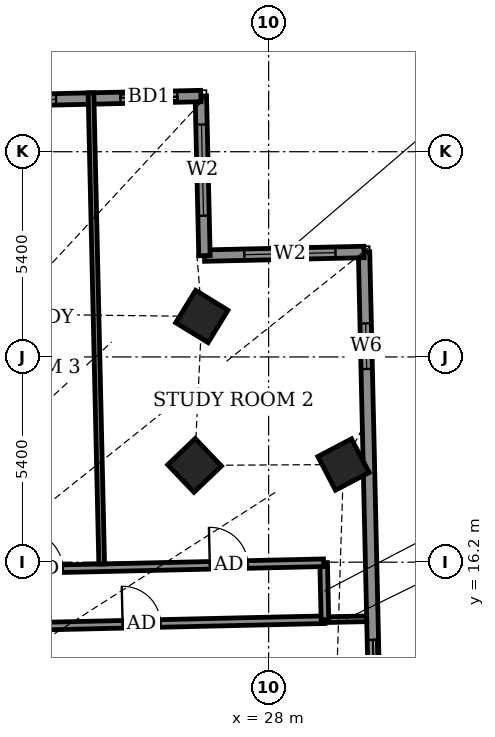
"""IFC4 building model, lengths in metres.
Left out: names, types, materials, properties, quantities, classifications, styles, units other than length and angle.
Written with IfcOpenShell. Run it as: python <this file> out.ifc"""

import sys

from ifc_helpers import new_model, si_unit, direction, frame, frame_2d, origin, origin_2d, place, context, subcontext, project, spatial, rectangle, extrude, element, fill, save


model = new_model("IFC4")
c1 = context("Model", 3, precision=1e-05, world=origin(), true_north=direction((0.0, 1.0)))
c2 = subcontext(c1, "Body", "Model", "MODEL_VIEW")
j1 = project(units=[si_unit("LENGTHUNIT", "METRE"), si_unit("PLANEANGLEUNIT", "RADIAN")], contexts=[c1])
p1 = place(None, origin())
s1 = spatial("IfcSite", under=j1, at=p1, CompositionType="ELEMENT")
p2 = place(p1, origin())
s2 = spatial("IfcBuilding", under=s1, at=p2, CompositionType="ELEMENT")
p3 = place(p2, frame((0.0, 0.0, 275.3)))
s3 = spatial("IfcBuildingStorey", under=s2, at=p3, CompositionType="ELEMENT", Elevation=275.3)
for number, where, z_axis, x_axis in (
    (1, (29.969, 18.77, -0.55), (0.0, 0.0, 1.0), (-0.465, 0.885, 0.0)),
    (2, (26.052, 18.747, -0.55), (0.0, 0.0, 1.0), (-0.691, 0.723, 0.0)),
    (3, (26.243, 22.665, -0.55), (0.0, 0.0, 1.0), (-0.852, 0.523, 0.0)),
):
    element("IfcColumn", number, at=place(p3, frame(where, z_axis=z_axis, x_axis=x_axis)), inside=s3, PredefinedType="COLUMN", context=c2, shape_type="SweptSolid", body=[
        extrude(rectangle(XDim=1.0, YDim=1.0, at=origin_2d()), origin(), (0.0, 0.0, 1.0), 4.6),
    ])
p4 = place(p3, frame((30.86, 8.973, 0.0), z_axis=(0.0, 0.0, 1.0), x_axis=(-0.022743742485, 0.999741327633, 0.0)))
e4 = element("IfcWall", 4, at=p4, inside=s3, PredefinedType="SOLIDWALL", context=c2, shape_type="SweptSolid", body=[
    extrude(rectangle(XDim=15.393, YDim=0.3, at=frame_2d((7.697, 0.0))), origin(), (0.0, 0.0, 1.0), 2.35),
])
p5 = place(p4, frame((3.684, 0.0, 0.0)))
e5 = element("IfcOpeningElement", 5, at=p5, cuts=e4, PredefinedType="OPENING", context=c2, shape_type="SweptSolid", body=[
    extrude(rectangle(XDim=1.5, YDim=2.0, at=frame_2d((0.75, 1.0))), frame((0.0, 0.16, 0.0), z_axis=(0.0, -1.0, 0.0), x_axis=(1.0, 0.0, 0.0)), (0.0, 0.0, 1.0), 0.32),
])
p6 = place(p4, frame((12.313, 0.0, 0.5)))
e6 = element("IfcOpeningElement", 6, at=p6, cuts=e4, PredefinedType="OPENING", context=c2, shape_type="SweptSolid", body=[
    extrude(rectangle(XDim=1.2, YDim=1.1, at=frame_2d((0.6, 0.55))), frame((0.0, 0.16, 0.0), z_axis=(0.0, -1.0, 0.0), x_axis=(1.0, 0.0, 0.0)), (0.0, 0.0, 1.0), 0.32),
])
p7 = place(p3, frame((30.51, 24.362, 0.0), z_axis=(0.0, 0.0, 1.0), x_axis=(-0.999739037152, -0.022844202663, 0.0)))
e7 = element("IfcWall", 7, at=p7, inside=s3, PredefinedType="SOLIDWALL", context=c2, shape_type="SweptSolid", body=[
    extrude(rectangle(XDim=4.2, YDim=0.3, at=frame_2d((2.1, 0.0))), origin(), (0.0, 0.0, 1.0), 2.55),
])
p8 = place(p7, frame((0.75, 0.0, 0.9)))
e8 = element("IfcOpeningElement", 8, at=p8, cuts=e7, PredefinedType="OPENING", context=c2, shape_type="SweptSolid", body=[
    extrude(rectangle(XDim=2.4, YDim=1.5, at=frame_2d((1.2, 0.75))), frame((0.0, 0.16, 0.0), z_axis=(0.0, -1.0, 0.0), x_axis=(1.0, 0.0, 0.0)), (0.0, 0.0, 1.0), 0.32),
])
p9 = place(p3, frame((26.311, 24.266, 0.0), z_axis=(0.0, 0.0, 1.0), x_axis=(-0.022611811187, 0.999744320311, 0.0)))
e9 = element("IfcWall", 9, at=p9, inside=s3, PredefinedType="SOLIDWALL", context=c2, shape_type="SweptSolid", body=[
    extrude(rectangle(XDim=4.2, YDim=0.3, at=frame_2d((2.1, 0.0))), origin(), (0.0, 0.0, 1.0), 2.55),
])
p10 = place(p9, frame((1.05, 0.0, 0.9)))
e10 = element("IfcOpeningElement", 10, at=p10, cuts=e9, PredefinedType="OPENING", context=c2, shape_type="SweptSolid", body=[
    extrude(rectangle(XDim=2.4, YDim=1.5, at=frame_2d((1.2, 0.75))), frame((0.0, 0.16, 0.0), z_axis=(0.0, -1.0, 0.0), x_axis=(1.0, 0.0, 0.0)), (0.0, 0.0, 1.0), 0.32),
])
p11 = place(p3, frame((26.216, 28.465, 0.0), z_axis=(0.0, 0.0, 1.0), x_axis=(-0.999742843677, -0.022677004157, 0.0)))
e11 = element("IfcWall", 11, at=p11, inside=s3, PredefinedType="SOLIDWALL", context=c2, shape_type="SweptSolid", body=[
    extrude(rectangle(XDim=49.836, YDim=0.3, at=frame_2d((24.918, 0.0))), origin(), (0.0, 0.0, 1.0), 2.45),
])
p12 = place(p11, frame((0.618, 0.0, 0.0)))
e12 = element("IfcOpeningElement", 12, at=p12, cuts=e11, PredefinedType="OPENING", context=c2, shape_type="SweptSolid", body=[
    extrude(rectangle(XDim=1.5, YDim=2.4, at=frame_2d((0.75, 1.2))), frame((0.0, 0.16, 0.0), z_axis=(0.0, -1.0, 0.0), x_axis=(1.0, 0.0, 0.0)), (0.0, 0.0, 1.0), 0.32),
])
p13 = place(p11, frame((3.811, 0.0, 0.9)))
e13 = element("IfcOpeningElement", 13, at=p13, cuts=e11, PredefinedType="OPENING", context=c2, shape_type="SweptSolid", body=[
    extrude(rectangle(XDim=1.2, YDim=1.5, at=frame_2d((0.6, 0.75))), frame((0.0, 0.16, 0.0), z_axis=(0.0, -1.0, 0.0), x_axis=(1.0, 0.0, 0.0)), (0.0, 0.0, 1.0), 0.32),
])
p14 = place(p11, frame((7.736, 0.0, 0.9)))
e14 = element("IfcOpeningElement", 14, at=p14, cuts=e11, PredefinedType="OPENING", context=c2, shape_type="SweptSolid", body=[
    extrude(rectangle(XDim=2.4, YDim=1.5, at=frame_2d((1.2, 0.75))), frame((0.0, 0.16, 0.0), z_axis=(0.0, -1.0, 0.0), x_axis=(1.0, 0.0, 0.0)), (0.0, 0.0, 1.0), 0.32),
])
p15 = place(p11, frame((13.686, 0.0, 0.0)))
e15 = element("IfcOpeningElement", 15, at=p15, cuts=e11, PredefinedType="OPENING", context=c2, shape_type="SweptSolid", body=[
    extrude(rectangle(XDim=1.5, YDim=2.4, at=frame_2d((0.75, 1.2))), frame((0.0, 0.16, 0.0), z_axis=(0.0, -1.0, 0.0), x_axis=(1.0, 0.0, 0.0)), (0.0, 0.0, 1.0), 0.32),
])
p16 = place(p11, frame((18.686, 0.0, 0.0)))
e16 = element("IfcOpeningElement", 16, at=p16, cuts=e11, PredefinedType="OPENING", context=c2, shape_type="SweptSolid", body=[
    extrude(rectangle(XDim=1.5, YDim=2.4, at=frame_2d((0.75, 1.2))), frame((0.0, 0.16, 0.0), z_axis=(0.0, -1.0, 0.0), x_axis=(1.0, 0.0, 0.0)), (0.0, 0.0, 1.0), 0.32),
])
p17 = place(p11, frame((23.711, 0.0, 0.0)))
e17 = element("IfcOpeningElement", 17, at=p17, cuts=e11, PredefinedType="OPENING", context=c2, shape_type="SweptSolid", body=[
    extrude(rectangle(XDim=1.5, YDim=2.4, at=frame_2d((0.75, 1.2))), frame((0.0, 0.16, 0.0), z_axis=(0.0, -1.0, 0.0), x_axis=(1.0, 0.0, 0.0)), (0.0, 0.0, 1.0), 0.32),
])
p18 = place(p11, frame((30.486, 0.0, 0.0)))
e18 = element("IfcOpeningElement", 18, at=p18, cuts=e11, PredefinedType="OPENING", context=c2, shape_type="SweptSolid", body=[
    extrude(rectangle(XDim=1.5, YDim=2.4, at=frame_2d((0.75, 1.2))), frame((0.0, 0.16, 0.0), z_axis=(0.0, -1.0, 0.0), x_axis=(1.0, 0.0, 0.0)), (0.0, 0.0, 1.0), 0.32),
])
p19 = place(p11, frame((37.286, 0.0, 0.9)))
e19 = element("IfcOpeningElement", 19, at=p19, cuts=e11, PredefinedType="OPENING", context=c2, shape_type="SweptSolid", body=[
    extrude(rectangle(XDim=2.4, YDim=1.5, at=frame_2d((1.2, 0.75))), frame((0.0, 0.16, 0.0), z_axis=(0.0, -1.0, 0.0), x_axis=(1.0, 0.0, 0.0)), (0.0, 0.0, 1.0), 0.32),
])
p20 = place(p11, frame((44.536, 0.0, 0.9)))
e20 = element("IfcOpeningElement", 20, at=p20, cuts=e11, PredefinedType="OPENING", context=c2, shape_type="SweptSolid", body=[
    extrude(rectangle(XDim=2.4, YDim=1.5, at=frame_2d((1.2, 0.75))), frame((0.0, 0.16, 0.0), z_axis=(0.0, -1.0, 0.0), x_axis=(1.0, 0.0, 0.0)), (0.0, 0.0, 1.0), 0.32),
])
p21 = place(p3, frame((18.382, 14.434, 0.0), z_axis=(0.0, 0.0, 1.0), x_axis=(0.999742346277, 0.022698921993, 0.0)))
e21 = element("IfcWall", 21, at=p21, inside=s3, PredefinedType="PARTITIONING", context=c2, shape_type="SweptSolid", body=[
    extrude(rectangle(XDim=11.1, YDim=0.2, at=frame_2d((5.55, 0.0))), origin(), (0.0, 0.0, 1.0), 2.35),
])
p22 = place(p21, frame((5.777, 0.0, 0.0)))
e22 = element("IfcOpeningElement", 22, at=p22, cuts=e21, PredefinedType="OPENING", context=c2, shape_type="SweptSolid", body=[
    extrude(rectangle(XDim=1.0, YDim=2.1, at=frame_2d((0.5, 1.05))), frame((0.0, 0.11, 0.0), z_axis=(0.0, -1.0, 0.0), x_axis=(1.0, 0.0, 0.0)), (0.0, 0.0, 1.0), 0.22),
])
p23 = place(p3, frame((29.479, 14.686, 0.0), z_axis=(0.0, 0.0, 1.0), x_axis=(0.9997438932, 0.022630687329, 0.0)))
e23 = element("IfcWall", 23, at=p23, inside=s3, PredefinedType="PARTITIONING", context=c2, shape_type="SweptSolid", body=[
    extrude(rectangle(XDim=1.1, YDim=0.15, at=frame_2d((0.55, 0.0))), origin(), (0.0, 0.0, 1.0), 2.35),
])
p24 = place(p3, frame((29.481, 14.686, 0.0), z_axis=(0.0, 0.0, 1.0), x_axis=(-0.022617910375, 0.999744182344, 0.0)))
e24 = element("IfcWall", 24, at=p24, inside=s3, PredefinedType="PARTITIONING", context=c2, shape_type="SweptSolid", body=[
    extrude(rectangle(XDim=1.5, YDim=0.2, at=frame_2d((0.75, 0.0))), origin(), (0.0, 0.0, 1.0), 2.35),
])
p25 = place(p3, frame((-24.566, 14.96, 0.0), z_axis=(0.0, 0.0, 1.0), x_axis=(0.999742854064, 0.022676546211, 0.0)))
e25 = element("IfcWall", 25, at=p25, inside=s3, PredefinedType="PARTITIONING", context=c2, shape_type="SweptSolid", body=[
    extrude(rectangle(XDim=54.025, YDim=0.2, at=frame_2d((27.012, 0.0))), origin(), (0.0, 0.0, 1.0), 2.35),
])
p26 = place(p25, frame((51.031, 0.0, 0.0)))
e26 = element("IfcOpeningElement", 26, at=p26, cuts=e25, PredefinedType="OPENING", context=c2, shape_type="SweptSolid", body=[
    extrude(rectangle(XDim=1.0, YDim=2.1, at=frame_2d((0.5, 1.05))), frame((0.0, 0.11, 0.0), z_axis=(0.0, -1.0, 0.0), x_axis=(1.0, 0.0, 0.0)), (0.0, 0.0, 1.0), 0.22),
])
p27 = place(p25, frame((46.164, 0.0, 0.0)))
e27 = element("IfcOpeningElement", 27, at=p27, cuts=e25, PredefinedType="OPENING", context=c2, shape_type="SweptSolid", body=[
    extrude(rectangle(XDim=1.0, YDim=2.1, at=frame_2d((0.5, 1.05))), frame((0.0, 0.11, 0.0), z_axis=(0.0, -1.0, 0.0), x_axis=(1.0, 0.0, 0.0)), (0.0, 0.0, 1.0), 0.22),
])
p28 = place(p25, frame((41.639, 0.0, 0.0)))
e28 = element("IfcOpeningElement", 28, at=p28, cuts=e25, PredefinedType="OPENING", context=c2, shape_type="SweptSolid", body=[
    extrude(rectangle(XDim=1.0, YDim=2.1, at=frame_2d((0.5, 1.05))), frame((0.0, 0.11, 0.0), z_axis=(0.0, -1.0, 0.0), x_axis=(1.0, 0.0, 0.0)), (0.0, 0.0, 1.0), 0.22),
])
p29 = place(p25, frame((37.389, 0.0, 0.0)))
e29 = element("IfcOpeningElement", 29, at=p29, cuts=e25, PredefinedType="OPENING", context=c2, shape_type="SweptSolid", body=[
    extrude(rectangle(XDim=0.9, YDim=2.1, at=frame_2d((0.45, 1.05))), frame((0.0, 0.11, 0.0), z_axis=(0.0, -1.0, 0.0), x_axis=(1.0, 0.0, 0.0)), (0.0, 0.0, 1.0), 0.22),
])
p30 = place(p25, frame((29.989, 0.0, 0.0)))
e30 = element("IfcOpeningElement", 30, at=p30, cuts=e25, PredefinedType="OPENING", context=c2, shape_type="SweptSolid", body=[
    extrude(rectangle(XDim=0.9, YDim=2.1, at=frame_2d((0.45, 1.05))), frame((0.0, 0.11, 0.0), z_axis=(0.0, -1.0, 0.0), x_axis=(1.0, 0.0, 0.0)), (0.0, 0.0, 1.0), 0.22),
])
p31 = place(p25, frame((27.364, 0.0, 0.0)))
e31 = element("IfcOpeningElement", 31, at=p31, cuts=e25, PredefinedType="OPENING", context=c2, shape_type="SweptSolid", body=[
    extrude(rectangle(XDim=0.9, YDim=2.1, at=frame_2d((0.45, 1.05))), frame((0.0, 0.11, 0.0), z_axis=(0.0, -1.0, 0.0), x_axis=(1.0, 0.0, 0.0)), (0.0, 0.0, 1.0), 0.22),
])
p32 = place(p25, frame((18.139, 0.0, 0.0)))
e32 = element("IfcOpeningElement", 32, at=p32, cuts=e25, PredefinedType="OPENING", context=c2, shape_type="SweptSolid", body=[
    extrude(rectangle(XDim=1.0, YDim=2.1, at=frame_2d((0.5, 1.05))), frame((0.0, 0.11, 0.0), z_axis=(0.0, -1.0, 0.0), x_axis=(1.0, 0.0, 0.0)), (0.0, 0.0, 1.0), 0.22),
])
p33 = place(p25, frame((22.439, 0.0, 0.0)))
e33 = element("IfcOpeningElement", 33, at=p33, cuts=e25, PredefinedType="OPENING", context=c2, shape_type="SweptSolid", body=[
    extrude(rectangle(XDim=0.9, YDim=2.1, at=frame_2d((0.45, 1.05))), frame((0.0, 0.11, 0.0), z_axis=(0.0, -1.0, 0.0), x_axis=(1.0, 0.0, 0.0)), (0.0, 0.0, 1.0), 0.22),
])
p34 = place(p25, frame((12.089, 0.0, 0.0)))
e34 = element("IfcOpeningElement", 34, at=p34, cuts=e25, PredefinedType="OPENING", context=c2, shape_type="SweptSolid", body=[
    extrude(rectangle(XDim=1.0, YDim=2.1, at=frame_2d((0.5, 1.05))), frame((0.0, 0.11, 0.0), z_axis=(0.0, -1.0, 0.0), x_axis=(1.0, 0.0, 0.0)), (0.0, 0.0, 1.0), 0.22),
])
p35 = place(p25, frame((2.918, 0.0, 0.0)))
e35 = element("IfcOpeningElement", 35, at=p35, cuts=e25, PredefinedType="OPENING", context=c2, shape_type="SweptSolid", body=[
    extrude(rectangle(XDim=1.0, YDim=2.1, at=frame_2d((0.5, 1.05))), frame((0.0, 0.11, 0.0), z_axis=(0.0, -1.0, 0.0), x_axis=(1.0, 0.0, 0.0)), (0.0, 0.0, 1.0), 0.22),
])
p36 = place(p3, frame((23.607, 16.153, 0.0), z_axis=(0.0, 0.0, 1.0), x_axis=(-0.022740189192, 0.999741408463, 0.0)))
e36 = element("IfcWall", 36, at=p36, inside=s3, PredefinedType="PARTITIONING", context=c2, shape_type="SweptSolid", body=[
    extrude(rectangle(XDim=12.4, YDim=0.15, at=frame_2d((6.2, 0.0))), origin(), (0.0, 0.0, 1.0), 2.35),
])
p37 = place(p5, origin())
e37 = element("IfcDoor", 37, at=p37, inside=s3, OperationType="SLIDING_TO_LEFT", PredefinedType="DOOR", context=c2, shape_type="SweptSolid", body=[
    extrude(rectangle(XDim=1.5, YDim=2.0, at=frame_2d((0.75, 1.0))), frame((0.0, 0.025, 0.0), z_axis=(0.0, -1.0, 0.0), x_axis=(1.0, 0.0, 0.0)), (0.0, 0.0, 1.0), 0.05),
])
fill(e5, e37)
p38 = place(p6, origin())
e38 = element("IfcWindow", 38, at=p38, inside=s3, PartitioningType="SINGLE_PANEL", PredefinedType="WINDOW", context=c2, shape_type="SweptSolid", body=[
    extrude(rectangle(XDim=1.2, YDim=1.1, at=frame_2d((0.6, 0.55))), frame((0.0, 0.03, 0.0), z_axis=(0.0, -1.0, 0.0), x_axis=(1.0, 0.0, 0.0)), (0.0, 0.0, 1.0), 0.06),
])
fill(e6, e38)
p39 = place(p8, origin())
e39 = element("IfcWindow", 39, at=p39, inside=s3, PartitioningType="DOUBLE_PANEL_VERTICAL", PredefinedType="WINDOW", context=c2, shape_type="SweptSolid", body=[
    extrude(rectangle(XDim=2.4, YDim=1.5, at=frame_2d((1.2, 0.75))), frame((0.0, 0.03, 0.0), z_axis=(0.0, -1.0, 0.0), x_axis=(1.0, 0.0, 0.0)), (0.0, 0.0, 1.0), 0.06),
])
fill(e8, e39)
p40 = place(p10, origin())
e40 = element("IfcWindow", 40, at=p40, inside=s3, PartitioningType="DOUBLE_PANEL_VERTICAL", PredefinedType="WINDOW", context=c2, shape_type="SweptSolid", body=[
    extrude(rectangle(XDim=2.4, YDim=1.5, at=frame_2d((1.2, 0.75))), frame((0.0, 0.03, 0.0), z_axis=(0.0, -1.0, 0.0), x_axis=(1.0, 0.0, 0.0)), (0.0, 0.0, 1.0), 0.06),
])
fill(e10, e40)
p41 = place(p12, origin())
e41 = element("IfcDoor", 41, at=p41, inside=s3, OperationType="SLIDING_TO_LEFT", PredefinedType="DOOR", context=c2, shape_type="SweptSolid", body=[
    extrude(rectangle(XDim=1.5, YDim=2.4, at=frame_2d((0.75, 1.2))), frame((0.0, 0.025, 0.0), z_axis=(0.0, -1.0, 0.0), x_axis=(1.0, 0.0, 0.0)), (0.0, 0.0, 1.0), 0.05),
])
fill(e12, e41)
p42 = place(p13, origin())
e42 = element("IfcWindow", 42, at=p42, inside=s3, PartitioningType="SINGLE_PANEL", PredefinedType="WINDOW", context=c2, shape_type="SweptSolid", body=[
    extrude(rectangle(XDim=1.2, YDim=1.5, at=frame_2d((0.6, 0.75))), frame((0.0, 0.03, 0.0), z_axis=(0.0, -1.0, 0.0), x_axis=(1.0, 0.0, 0.0)), (0.0, 0.0, 1.0), 0.06),
])
fill(e13, e42)
p43 = place(p22, origin())
e43 = element("IfcDoor", 43, at=p43, inside=s3, OperationType="SINGLE_SWING_LEFT", PredefinedType="DOOR", context=c2, shape_type="SweptSolid", body=[
    extrude(rectangle(XDim=1.0, YDim=2.1, at=frame_2d((0.5, 1.05))), frame((0.0, 0.025, 0.0), z_axis=(0.0, -1.0, 0.0), x_axis=(1.0, 0.0, 0.0)), (0.0, 0.0, 1.0), 0.05),
])
fill(e22, e43)
p44 = place(p26, origin())
e44 = element("IfcDoor", 44, at=p44, inside=s3, OperationType="SINGLE_SWING_RIGHT", PredefinedType="DOOR", context=c2, shape_type="SweptSolid", body=[
    extrude(rectangle(XDim=1.0, YDim=2.1, at=frame_2d((0.5, 1.05))), frame((0.0, 0.025, 0.0), z_axis=(0.0, -1.0, 0.0), x_axis=(1.0, 0.0, 0.0)), (0.0, 0.0, 1.0), 0.05),
])
fill(e26, e44)
p45 = place(p27, origin())
e45 = element("IfcDoor", 45, at=p45, inside=s3, OperationType="SINGLE_SWING_LEFT", PredefinedType="DOOR", context=c2, shape_type="SweptSolid", body=[
    extrude(rectangle(XDim=1.0, YDim=2.1, at=frame_2d((0.5, 1.05))), frame((0.0, 0.025, 0.0), z_axis=(0.0, -1.0, 0.0), x_axis=(1.0, 0.0, 0.0)), (0.0, 0.0, 1.0), 0.05),
])
fill(e27, e45)
save(model, sys.argv[1])
